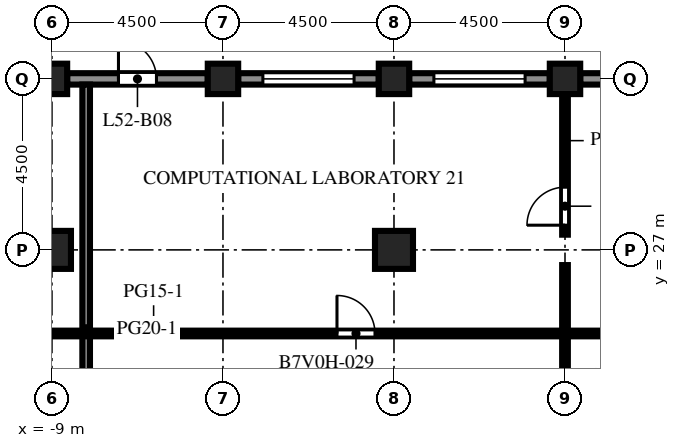
"""IFC4 building model, lengths in metres.
Left out: names, types, materials, properties, quantities, classifications, styles, units other than length and angle.
Written with IfcOpenShell. Run it as: python <this file> out.ifc"""

import sys

from ifc_helpers import new_model, si_unit, direction, frame, frame_2d, origin, origin_2d, place, context, subcontext, project, spatial, rectangle, extrude, element, fill, save


model = new_model("IFC4")
c1 = context("Model", 3, precision=1e-05, world=origin(), true_north=direction((0.0, 1.0)))
c2 = subcontext(c1, "Body", "Model", "MODEL_VIEW")
j1 = project(units=[si_unit("LENGTHUNIT", "METRE"), si_unit("PLANEANGLEUNIT", "RADIAN")], contexts=[c1])
p1 = place(None, origin())
s1 = spatial("IfcSite", under=j1, at=p1, CompositionType="ELEMENT")
p2 = place(p1, origin())
s2 = spatial("IfcBuilding", under=s1, at=p2, CompositionType="ELEMENT")
p3 = place(p2, frame((0.0, 0.0, 231.6)))
s3 = spatial("IfcBuildingStorey", under=s2, at=p3, CompositionType="ELEMENT", Elevation=231.6)
for number, where, z_axis, x_axis in (
    (1, (-9.0, 31.5, -0.45), (0.0, 0.0, 1.0), (1.0, 0.0, 0.0)),
    (2, (-4.5, 31.5, -0.45), (0.0, 0.0, 1.0), (1.0, 0.0, 0.0)),
    (3, (0.0, 31.5, -0.45), (0.0, 0.0, 1.0), (1.0, 0.0, 0.0)),
    (4, (4.5, 31.5, -0.45), (0.0, 0.0, 1.0), (1.0, 0.0, 0.0)),
):
    element("IfcColumn", number, at=place(p3, frame(where, z_axis=z_axis, x_axis=x_axis)), inside=s3, PredefinedType="COLUMN", context=c2, shape_type="SweptSolid", body=[
        extrude(rectangle(XDim=0.8, YDim=0.8, at=origin_2d()), origin(), (0.0, 0.0, 1.0), 4.55),
    ])
for number, where, z_axis, x_axis in (
    (5, (-9.0, 27.0, -0.45), (0.0, 0.0, 1.0), (1.0, 0.0, 0.0)),
    (6, (0.0, 27.0, -0.45), (0.0, 0.0, 1.0), (1.0, 0.0, 0.0)),
):
    element("IfcColumn", number, at=place(p3, frame(where, z_axis=z_axis, x_axis=x_axis)), inside=s3, PredefinedType="COLUMN", context=c2, shape_type="SweptSolid", body=[
        extrude(rectangle(XDim=1.0, YDim=1.0, at=origin_2d()), origin(), (0.0, 0.0, 1.0), 4.55),
    ])
p4 = place(p3, frame((4.9, 31.5, 0.0), z_axis=(0.0, 0.0, 1.0), x_axis=(1.0, 0.0, 0.0)))
e7 = element("IfcWall", 7, at=p4, inside=s3, PredefinedType="SOLIDWALL", context=c2, shape_type="SweptSolid", body=[
    extrude(rectangle(XDim=3.7, YDim=0.3, at=frame_2d((1.85, 0.0))), origin(), (0.0, 0.0, 1.0), 2.85),
])
p5 = place(p4, frame((0.65, 0.0, 0.8)))
e8 = element("IfcOpeningElement", 8, at=p5, cuts=e7, PredefinedType="OPENING", context=c2, shape_type="SweptSolid", body=[
    extrude(rectangle(XDim=2.4, YDim=1.7, at=frame_2d((1.2, 0.85))), frame((0.0, 0.16, 0.0), z_axis=(0.0, -1.0, 0.0), x_axis=(1.0, 0.0, 0.0)), (0.0, 0.0, 1.0), 0.32),
])
p6 = place(p3, frame((0.4, 31.5, 0.0), z_axis=(0.0, 0.0, 1.0), x_axis=(1.0, 0.0, 0.0)))
e9 = element("IfcWall", 9, at=p6, inside=s3, PredefinedType="SOLIDWALL", context=c2, shape_type="SweptSolid", body=[
    extrude(rectangle(XDim=3.7, YDim=0.3, at=frame_2d((1.85, 0.0))), origin(), (0.0, 0.0, 1.0), 2.85),
])
p7 = place(p6, frame((0.65, 0.0, 0.8)))
e10 = element("IfcOpeningElement", 10, at=p7, cuts=e9, PredefinedType="OPENING", context=c2, shape_type="SweptSolid", body=[
    extrude(rectangle(XDim=2.4, YDim=1.7, at=frame_2d((1.2, 0.85))), frame((0.0, 0.16, 0.0), z_axis=(0.0, -1.0, 0.0), x_axis=(1.0, 0.0, 0.0)), (0.0, 0.0, 1.0), 0.32),
])
p8 = place(p3, frame((-4.1, 31.5, 0.0), z_axis=(0.0, 0.0, 1.0), x_axis=(1.0, 0.0, 0.0)))
e11 = element("IfcWall", 11, at=p8, inside=s3, PredefinedType="SOLIDWALL", context=c2, shape_type="SweptSolid", body=[
    extrude(rectangle(XDim=3.7, YDim=0.3, at=frame_2d((1.85, 0.0))), origin(), (0.0, 0.0, 1.0), 2.85),
])
p9 = place(p8, frame((0.65, 0.0, 0.8)))
e12 = element("IfcOpeningElement", 12, at=p9, cuts=e11, PredefinedType="OPENING", context=c2, shape_type="SweptSolid", body=[
    extrude(rectangle(XDim=2.4, YDim=1.7, at=frame_2d((1.2, 0.85))), frame((0.0, 0.16, 0.0), z_axis=(0.0, -1.0, 0.0), x_axis=(1.0, 0.0, 0.0)), (0.0, 0.0, 1.0), 0.32),
])
p10 = place(p3, frame((-8.6, 31.5, 0.0), z_axis=(0.0, 0.0, 1.0), x_axis=(1.0, 0.0, 0.0)))
e13 = element("IfcWall", 13, at=p10, inside=s3, PredefinedType="SOLIDWALL", context=c2, shape_type="SweptSolid", body=[
    extrude(rectangle(XDim=3.7, YDim=0.3, at=frame_2d((1.85, 0.0))), origin(), (0.0, 0.0, 1.0), 2.85),
])
p11 = place(p10, frame((1.35, 0.0, 0.0)))
e14 = element("IfcOpeningElement", 14, at=p11, cuts=e13, PredefinedType="OPENING", context=c2, shape_type="SweptSolid", body=[
    extrude(rectangle(XDim=1.0, YDim=2.2, at=frame_2d((0.5, 1.1))), frame((0.0, 0.16, 0.0), z_axis=(0.0, -1.0, 0.0), x_axis=(1.0, 0.0, 0.0)), (0.0, 0.0, 1.0), 0.32),
])
p12 = place(p3, frame((-8.1, 18.5, 0.0), z_axis=(0.0, 0.0, 1.0), x_axis=(0.0, 1.0, 0.0)))
e15 = element("IfcWall", 15, at=p12, inside=s3, PredefinedType="PARTITIONING", context=c2, shape_type="SweptSolid", body=[
    extrude(rectangle(XDim=12.85, YDim=0.2, at=frame_2d((6.425, 0.0))), origin(), (0.0, 0.0, 1.0), 3.65),
])
p13 = place(p3, frame((4.5, 18.5, 0.0), z_axis=(0.0, 0.0, 1.0), x_axis=(0.0, 1.0, 0.0)))
e16 = element("IfcWall", 16, at=p13, inside=s3, PredefinedType="PARTITIONING", context=c2, shape_type="SweptSolid", body=[
    extrude(rectangle(XDim=8.1, YDim=0.15, at=frame_2d((4.05, 0.0))), origin(), (0.0, 0.0, 1.0), 3.65),
])
p14 = place(p3, frame((4.5, 31.1, 0.0), z_axis=(0.0, 0.0, 1.0), x_axis=(0.0, -1.0, 0.0)))
e17 = element("IfcWall", 17, at=p14, inside=s3, PredefinedType="PARTITIONING", context=c2, shape_type="SweptSolid", body=[
    extrude(rectangle(XDim=3.7, YDim=0.15, at=frame_2d((1.85, 0.0))), origin(), (0.0, 0.0, 1.0), 3.65),
])
p15 = place(p14, frame((2.45, 0.0, 0.0)))
e18 = element("IfcOpeningElement", 18, at=p15, cuts=e17, PredefinedType="OPENING", context=c2, shape_type="SweptSolid", body=[
    extrude(rectangle(XDim=1.0, YDim=2.1, at=frame_2d((0.5, 1.05))), frame((0.0, 0.085, 0.0), z_axis=(0.0, -1.0, 0.0), x_axis=(1.0, 0.0, 0.0)), (0.0, 0.0, 1.0), 0.17),
])
p16 = place(p3, frame((-13.5, 24.8, 0.0), z_axis=(0.0, 0.0, 1.0), x_axis=(1.0, 0.0, 0.0)))
e19 = element("IfcWall", 19, at=p16, inside=s3, PredefinedType="PARTITIONING", context=c2, shape_type="SweptSolid", body=[
    extrude(rectangle(XDim=34.5, YDim=0.15, at=frame_2d((17.25, 0.0))), origin(), (0.0, 0.0, 1.0), 3.65),
])
p17 = place(p16, frame((1.35, 0.0, 0.0)))
e20 = element("IfcOpeningElement", 20, at=p17, cuts=e19, PredefinedType="OPENING", context=c2, shape_type="SweptSolid", body=[
    extrude(rectangle(XDim=1.0, YDim=2.1, at=frame_2d((0.5, 1.05))), frame((0.0, 0.085, 0.0), z_axis=(0.0, -1.0, 0.0), x_axis=(1.0, 0.0, 0.0)), (0.0, 0.0, 1.0), 0.17),
])
p18 = place(p16, frame((12.0, 0.0, 0.0)))
e21 = element("IfcOpeningElement", 21, at=p18, cuts=e19, PredefinedType="OPENING", context=c2, shape_type="SweptSolid", body=[
    extrude(rectangle(XDim=1.0, YDim=2.1, at=frame_2d((0.5, 1.05))), frame((0.0, 0.085, 0.0), z_axis=(0.0, -1.0, 0.0), x_axis=(1.0, 0.0, 0.0)), (0.0, 0.0, 1.0), 0.17),
])
p19 = place(p16, frame((20.85, 0.0, 0.0)))
e22 = element("IfcOpeningElement", 22, at=p19, cuts=e19, PredefinedType="OPENING", context=c2, shape_type="SweptSolid", body=[
    extrude(rectangle(XDim=1.0, YDim=2.1, at=frame_2d((0.5, 1.05))), frame((0.0, 0.085, 0.0), z_axis=(0.0, -1.0, 0.0), x_axis=(1.0, 0.0, 0.0)), (0.0, 0.0, 1.0), 0.17),
])
p20 = place(p16, frame((29.85, 0.0, 0.0)))
e23 = element("IfcOpeningElement", 23, at=p20, cuts=e19, PredefinedType="OPENING", context=c2, shape_type="SweptSolid", body=[
    extrude(rectangle(XDim=1.0, YDim=2.1, at=frame_2d((0.5, 1.05))), frame((0.0, 0.085, 0.0), z_axis=(0.0, -1.0, 0.0), x_axis=(1.0, 0.0, 0.0)), (0.0, 0.0, 1.0), 0.17),
])
p21 = place(p7, origin())
e24 = element("IfcWindow", 24, at=p21, inside=s3, PartitioningType="SINGLE_PANEL", PredefinedType="WINDOW", context=c2, shape_type="SweptSolid", body=[
    extrude(rectangle(XDim=2.4, YDim=1.7, at=frame_2d((1.2, 0.85))), frame((0.0, 0.03, 0.0), z_axis=(0.0, -1.0, 0.0), x_axis=(1.0, 0.0, 0.0)), (0.0, 0.0, 1.0), 0.06),
])
fill(e10, e24)
p22 = place(p9, origin())
e25 = element("IfcWindow", 25, at=p22, inside=s3, PartitioningType="SINGLE_PANEL", PredefinedType="WINDOW", context=c2, shape_type="SweptSolid", body=[
    extrude(rectangle(XDim=2.4, YDim=1.7, at=frame_2d((1.2, 0.85))), frame((0.0, 0.03, 0.0), z_axis=(0.0, -1.0, 0.0), x_axis=(1.0, 0.0, 0.0)), (0.0, 0.0, 1.0), 0.06),
])
fill(e12, e25)
p23 = place(p11, origin())
e26 = element("IfcDoor", 26, at=p23, inside=s3, OperationType="SINGLE_SWING_LEFT", PredefinedType="DOOR", context=c2, shape_type="SweptSolid", body=[
    extrude(rectangle(XDim=1.0, YDim=2.2, at=frame_2d((0.5, 1.1))), frame((0.0, 0.025, 0.0), z_axis=(0.0, -1.0, 0.0), x_axis=(1.0, 0.0, 0.0)), (0.0, 0.0, 1.0), 0.05),
])
fill(e14, e26)
p24 = place(p15, origin())
e27 = element("IfcDoor", 27, at=p24, inside=s3, OperationType="SINGLE_SWING_RIGHT", PredefinedType="DOOR", context=c2, shape_type="SweptSolid", body=[
    extrude(rectangle(XDim=1.0, YDim=2.1, at=frame_2d((0.5, 1.05))), frame((0.0, 0.025, 0.0), z_axis=(0.0, -1.0, 0.0), x_axis=(1.0, 0.0, 0.0)), (0.0, 0.0, 1.0), 0.05),
])
fill(e18, e27)
p25 = place(p18, origin())
e28 = element("IfcDoor", 28, at=p25, inside=s3, OperationType="SINGLE_SWING_LEFT", PredefinedType="DOOR", context=c2, shape_type="SweptSolid", body=[
    extrude(rectangle(XDim=1.0, YDim=2.1, at=frame_2d((0.5, 1.05))), frame((0.0, 0.025, 0.0), z_axis=(0.0, -1.0, 0.0), x_axis=(1.0, 0.0, 0.0)), (0.0, 0.0, 1.0), 0.05),
])
fill(e21, e28)
save(model, sys.argv[1])
